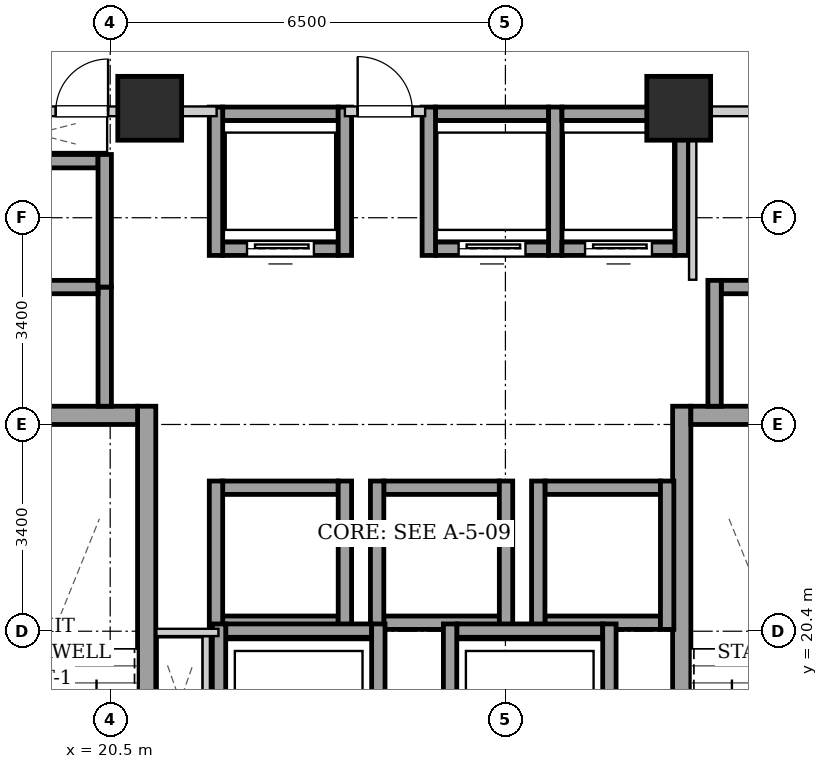
"""IFC4 building model, lengths in metres.
Left out: names, types, materials, properties, quantities, classifications, styles, units other than length and angle.
Written with IfcOpenShell. Run it as: python <this file> out.ifc"""

import sys

from ifc_helpers import new_model, si_unit, direction, frame, frame_2d, origin, origin_2d, place, context, subcontext, project, spatial, rectangle, extrude, element, fill, save


model = new_model("IFC4")
c1 = context("Model", 3, precision=1e-05, world=origin(), true_north=direction((0.0, 1.0)))
c2 = subcontext(c1, "Body", "Model", "MODEL_VIEW")
j1 = project(units=[si_unit("LENGTHUNIT", "METRE"), si_unit("PLANEANGLEUNIT", "RADIAN")], contexts=[c1])
p1 = place(None, origin())
s1 = spatial("IfcSite", under=j1, at=p1, CompositionType="ELEMENT")
p2 = place(p1, origin())
s2 = spatial("IfcBuilding", under=s1, at=p2, CompositionType="ELEMENT")
p3 = place(p2, frame((0.0, 0.0, 119.9)))
s3 = spatial("IfcBuildingStorey", under=s2, at=p3, CompositionType="ELEMENT", Elevation=119.9)
for number, where, z_axis, x_axis in (
    (1, (21.15, 29.0, 0.0), (0.0, 0.0, 1.0), (1.0, 0.0, 0.0)),
    (2, (29.85, 29.0, 0.0), (0.0, 0.0, 1.0), (1.0, 0.0, 0.0)),
):
    element("IfcColumn", number, at=place(p3, frame(where, z_axis=z_axis, x_axis=x_axis)), inside=s3, PredefinedType="COLUMN", context=c2, shape_type="SweptSolid", body=[
        extrude(rectangle(XDim=1.05, YDim=1.05, at=origin_2d()), origin(), (0.0, 0.0, 1.0), 4.5),
    ])
p4 = place(p3, frame((21.1, 15.1, 0.0), z_axis=(0.0, 0.0, 1.0), x_axis=(0.0, 1.0, 0.0)))
e3 = element("IfcWall", 3, at=p4, inside=s3, PredefinedType="SHEAR", context=c2, shape_type="SweptSolid", body=[
    extrude(rectangle(XDim=9.0, YDim=0.3, at=frame_2d((4.5, 0.0))), origin(), (0.0, 0.0, 1.0), 4.18),
])
p5 = place(p3, frame((18.1, 23.95, 0.0), z_axis=(0.0, 0.0, 1.0), x_axis=(1.0, 0.0, 0.0)))
e4 = element("IfcWall", 4, at=p5, inside=s3, PredefinedType="SHEAR", context=c2, shape_type="SweptSolid", body=[
    extrude(rectangle(XDim=2.85, YDim=0.3, at=frame_2d((1.425, 0.0))), origin(), (0.0, 0.0, 1.0), 4.18),
])
p6 = place(p3, frame((29.9, 15.1, 0.0), z_axis=(0.0, 0.0, 1.0), x_axis=(0.0, 1.0, 0.0)))
e5 = element("IfcWall", 5, at=p6, inside=s3, PredefinedType="SHEAR", context=c2, shape_type="SweptSolid", body=[
    extrude(rectangle(XDim=9.0, YDim=0.3, at=frame_2d((4.5, 0.0))), origin(), (0.0, 0.0, 1.0), 4.18),
])
p7 = place(p3, frame((30.05, 23.95, 0.0), z_axis=(0.0, 0.0, 1.0), x_axis=(1.0, 0.0, 0.0)))
e6 = element("IfcWall", 6, at=p7, inside=s3, PredefinedType="SHEAR", context=c2, shape_type="SweptSolid", body=[
    extrude(rectangle(XDim=2.85, YDim=0.3, at=frame_2d((1.425, 0.0))), origin(), (0.0, 0.0, 1.0), 4.18),
])
p8 = place(p3, frame((22.35, 26.69, 0.0), z_axis=(0.0, 0.0, 1.0), x_axis=(1.0, 0.0, 0.0)))
e7 = element("IfcWall", 7, at=p8, inside=s3, PredefinedType="SHEAR", context=c2, shape_type="SweptSolid", body=[
    extrude(rectangle(XDim=1.9, YDim=0.22, at=frame_2d((0.95, 0.0))), origin(), (0.0, 0.0, 1.0), 4.18),
])
p9 = place(p8, frame((0.4, 0.0, 0.0)))
e8 = element("IfcOpeningElement", 8, at=p9, cuts=e7, PredefinedType="OPENING", context=c2, shape_type="SweptSolid", body=[
    extrude(rectangle(XDim=1.1, YDim=2.15, at=frame_2d((0.55, 1.075))), frame((0.0, 0.12, 0.0), z_axis=(0.0, -1.0, 0.0), x_axis=(1.0, 0.0, 0.0)), (0.0, 0.0, 1.0), 0.24),
])
p10 = place(p3, frame((22.35, 28.91, 0.0), z_axis=(0.0, 0.0, 1.0), x_axis=(1.0, 0.0, 0.0)))
e9 = element("IfcWall", 9, at=p10, inside=s3, PredefinedType="SHEAR", context=c2, shape_type="SweptSolid", body=[
    extrude(rectangle(XDim=1.9, YDim=0.22, at=frame_2d((0.95, 0.0))), origin(), (0.0, 0.0, 1.0), 4.18),
])
for number, where, z_axis, x_axis in (
    (10, (22.24, 26.58, 0.0), (0.0, 0.0, 1.0), (0.0, 1.0, 0.0)),
    (11, (24.36, 26.58, 0.0), (0.0, 0.0, 1.0), (0.0, 1.0, 0.0)),
):
    element("IfcWall", number, at=place(p3, frame(where, z_axis=z_axis, x_axis=x_axis)), inside=s3, PredefinedType="SHEAR", context=c2, shape_type="SweptSolid", body=[
        extrude(rectangle(XDim=2.44, YDim=0.22, at=frame_2d((1.22, 0.0))), origin(), (0.0, 0.0, 1.0), 4.18),
    ])
p11 = place(p3, frame((25.85, 26.69, 0.0), z_axis=(0.0, 0.0, 1.0), x_axis=(1.0, 0.0, 0.0)))
e12 = element("IfcWall", 12, at=p11, inside=s3, PredefinedType="SHEAR", context=c2, shape_type="SweptSolid", body=[
    extrude(rectangle(XDim=1.86, YDim=0.22, at=frame_2d((0.93, 0.0))), origin(), (0.0, 0.0, 1.0), 4.18),
])
p12 = place(p11, frame((0.38, 0.0, 0.0)))
e13 = element("IfcOpeningElement", 13, at=p12, cuts=e12, PredefinedType="OPENING", context=c2, shape_type="SweptSolid", body=[
    extrude(rectangle(XDim=1.1, YDim=2.15, at=frame_2d((0.55, 1.075))), frame((0.0, 0.12, 0.0), z_axis=(0.0, -1.0, 0.0), x_axis=(1.0, 0.0, 0.0)), (0.0, 0.0, 1.0), 0.24),
])
p13 = place(p3, frame((25.85, 28.91, 0.0), z_axis=(0.0, 0.0, 1.0), x_axis=(1.0, 0.0, 0.0)))
e14 = element("IfcWall", 14, at=p13, inside=s3, PredefinedType="SHEAR", context=c2, shape_type="SweptSolid", body=[
    extrude(rectangle(XDim=1.86, YDim=0.22, at=frame_2d((0.93, 0.0))), origin(), (0.0, 0.0, 1.0), 4.18),
])
for number, where, z_axis, x_axis in (
    (15, (25.74, 26.58, 0.0), (0.0, 0.0, 1.0), (0.0, 1.0, 0.0)),
    (16, (27.82, 26.58, 0.0), (0.0, 0.0, 1.0), (0.0, 1.0, 0.0)),
):
    element("IfcWall", number, at=place(p3, frame(where, z_axis=z_axis, x_axis=x_axis)), inside=s3, PredefinedType="SHEAR", context=c2, shape_type="SweptSolid", body=[
        extrude(rectangle(XDim=2.44, YDim=0.22, at=frame_2d((1.22, 0.0))), origin(), (0.0, 0.0, 1.0), 4.18),
    ])
p14 = place(p3, frame((27.93, 26.69, 0.0), z_axis=(0.0, 0.0, 1.0), x_axis=(1.0, 0.0, 0.0)))
e17 = element("IfcWall", 17, at=p14, inside=s3, PredefinedType="SHEAR", context=c2, shape_type="SweptSolid", body=[
    extrude(rectangle(XDim=1.86, YDim=0.22, at=frame_2d((0.93, 0.0))), origin(), (0.0, 0.0, 1.0), 4.18),
])
p15 = place(p14, frame((0.38, 0.0, 0.0)))
e18 = element("IfcOpeningElement", 18, at=p15, cuts=e17, PredefinedType="OPENING", context=c2, shape_type="SweptSolid", body=[
    extrude(rectangle(XDim=1.1, YDim=2.15, at=frame_2d((0.55, 1.075))), frame((0.0, 0.12, 0.0), z_axis=(0.0, -1.0, 0.0), x_axis=(1.0, 0.0, 0.0)), (0.0, 0.0, 1.0), 0.24),
])
p16 = place(p3, frame((27.93, 28.91, 0.0), z_axis=(0.0, 0.0, 1.0), x_axis=(1.0, 0.0, 0.0)))
e19 = element("IfcWall", 19, at=p16, inside=s3, PredefinedType="SHEAR", context=c2, shape_type="SweptSolid", body=[
    extrude(rectangle(XDim=1.86, YDim=0.22, at=frame_2d((0.93, 0.0))), origin(), (0.0, 0.0, 1.0), 4.18),
])
p17 = place(p3, frame((29.9, 26.58, 0.0), z_axis=(0.0, 0.0, 1.0), x_axis=(0.0, 1.0, 0.0)))
e20 = element("IfcWall", 20, at=p17, inside=s3, PredefinedType="SHEAR", context=c2, shape_type="SweptSolid", body=[
    extrude(rectangle(XDim=2.44, YDim=0.22, at=frame_2d((1.22, 0.0))), origin(), (0.0, 0.0, 1.0), 4.18),
])
for number, where, z_axis, x_axis in (
    (21, (22.35, 20.54, 0.0), (0.0, 0.0, 1.0), (1.0, 0.0, 0.0)),
    (22, (22.35, 22.76, 0.0), (0.0, 0.0, 1.0), (1.0, 0.0, 0.0)),
):
    element("IfcWall", number, at=place(p3, frame(where, z_axis=z_axis, x_axis=x_axis)), inside=s3, PredefinedType="SHEAR", context=c2, shape_type="SweptSolid", body=[
        extrude(rectangle(XDim=1.9, YDim=0.22, at=frame_2d((0.95, 0.0))), origin(), (0.0, 0.0, 1.0), 4.18),
    ])
for number, where, z_axis, x_axis in (
    (23, (22.24, 20.43, 0.0), (0.0, 0.0, 1.0), (0.0, 1.0, 0.0)),
    (24, (24.36, 20.43, 0.0), (0.0, 0.0, 1.0), (0.0, 1.0, 0.0)),
):
    element("IfcWall", number, at=place(p3, frame(where, z_axis=z_axis, x_axis=x_axis)), inside=s3, PredefinedType="SHEAR", context=c2, shape_type="SweptSolid", body=[
        extrude(rectangle(XDim=2.44, YDim=0.22, at=frame_2d((1.22, 0.0))), origin(), (0.0, 0.0, 1.0), 4.18),
    ])
for number, where, z_axis, x_axis in (
    (25, (25.0, 20.54, 0.0), (0.0, 0.0, 1.0), (1.0, 0.0, 0.0)),
    (26, (25.0, 22.76, 0.0), (0.0, 0.0, 1.0), (1.0, 0.0, 0.0)),
):
    element("IfcWall", number, at=place(p3, frame(where, z_axis=z_axis, x_axis=x_axis)), inside=s3, PredefinedType="SHEAR", context=c2, shape_type="SweptSolid", body=[
        extrude(rectangle(XDim=1.9, YDim=0.22, at=frame_2d((0.95, 0.0))), origin(), (0.0, 0.0, 1.0), 4.18),
    ])
for number, where, z_axis, x_axis in (
    (27, (24.89, 20.43, 0.0), (0.0, 0.0, 1.0), (0.0, 1.0, 0.0)),
    (28, (27.01, 20.43, 0.0), (0.0, 0.0, 1.0), (0.0, 1.0, 0.0)),
):
    element("IfcWall", number, at=place(p3, frame(where, z_axis=z_axis, x_axis=x_axis)), inside=s3, PredefinedType="SHEAR", context=c2, shape_type="SweptSolid", body=[
        extrude(rectangle(XDim=2.44, YDim=0.22, at=frame_2d((1.22, 0.0))), origin(), (0.0, 0.0, 1.0), 4.18),
    ])
for number, where, z_axis, x_axis in (
    (29, (27.65, 20.54, 0.0), (0.0, 0.0, 1.0), (1.0, 0.0, 0.0)),
    (30, (27.65, 22.76, 0.0), (0.0, 0.0, 1.0), (1.0, 0.0, 0.0)),
):
    element("IfcWall", number, at=place(p3, frame(where, z_axis=z_axis, x_axis=x_axis)), inside=s3, PredefinedType="SHEAR", context=c2, shape_type="SweptSolid", body=[
        extrude(rectangle(XDim=1.9, YDim=0.22, at=frame_2d((0.95, 0.0))), origin(), (0.0, 0.0, 1.0), 4.18),
    ])
for number, where, z_axis, x_axis in (
    (31, (27.54, 20.43, 0.0), (0.0, 0.0, 1.0), (0.0, 1.0, 0.0)),
    (32, (29.66, 20.43, 0.0), (0.0, 0.0, 1.0), (0.0, 1.0, 0.0)),
):
    element("IfcWall", number, at=place(p3, frame(where, z_axis=z_axis, x_axis=x_axis)), inside=s3, PredefinedType="SHEAR", context=c2, shape_type="SweptSolid", body=[
        extrude(rectangle(XDim=2.44, YDim=0.22, at=frame_2d((1.22, 0.0))), origin(), (0.0, 0.0, 1.0), 4.18),
    ])
p18 = place(p3, frame((20.41, 24.1, 0.0), z_axis=(0.0, 0.0, 1.0), x_axis=(0.0, 1.0, 0.0)))
e33 = element("IfcWall", 33, at=p18, inside=s3, PredefinedType="SHEAR", context=c2, shape_type="SweptSolid", body=[
    extrude(rectangle(XDim=1.96, YDim=0.22, at=frame_2d((0.98, 0.0))), origin(), (0.0, 0.0, 1.0), 4.18),
])
for number, where, z_axis, x_axis in (
    (34, (18.4, 26.06, 0.0), (0.0, 0.0, 1.0), (1.0, 0.0, 0.0)),
    (35, (18.4, 28.13, 0.0), (0.0, 0.0, 1.0), (1.0, 0.0, 0.0)),
):
    element("IfcWall", number, at=place(p3, frame(where, z_axis=z_axis, x_axis=x_axis)), inside=s3, PredefinedType="SHEAR", context=c2, shape_type="SweptSolid", body=[
        extrude(rectangle(XDim=1.9, YDim=0.22, at=frame_2d((0.95, 0.0))), origin(), (0.0, 0.0, 1.0), 4.18),
    ])
p19 = place(p3, frame((20.41, 26.06, 0.0), z_axis=(0.0, 0.0, 1.0), x_axis=(0.0, 1.0, 0.0)))
e36 = element("IfcWall", 36, at=p19, inside=s3, PredefinedType="SHEAR", context=c2, shape_type="SweptSolid", body=[
    extrude(rectangle(XDim=2.18, YDim=0.22, at=frame_2d((1.09, 0.0))), origin(), (0.0, 0.0, 1.0), 4.18),
])
p20 = place(p3, frame((30.55, 26.06, 0.0), z_axis=(0.0, 0.0, 1.0), x_axis=(1.0, 0.0, 0.0)))
e37 = element("IfcWall", 37, at=p20, inside=s3, PredefinedType="SHEAR", context=c2, shape_type="SweptSolid", body=[
    extrude(rectangle(XDim=1.9, YDim=0.22, at=frame_2d((0.95, 0.0))), origin(), (0.0, 0.0, 1.0), 4.18),
])
p21 = place(p3, frame((30.44, 24.1, 0.0), z_axis=(0.0, 0.0, 1.0), x_axis=(0.0, 1.0, 0.0)))
e38 = element("IfcWall", 38, at=p21, inside=s3, PredefinedType="SHEAR", context=c2, shape_type="SweptSolid", body=[
    extrude(rectangle(XDim=2.07, YDim=0.22, at=frame_2d((1.035, 0.0))), origin(), (0.0, 0.0, 1.0), 4.18),
])
p22 = place(p3, frame((22.4, 20.41, 0.0), z_axis=(0.0, 0.0, 1.0), x_axis=(1.0, 0.0, 0.0)))
e39 = element("IfcWall", 39, at=p22, inside=s3, PredefinedType="SHEAR", context=c2, shape_type="SweptSolid", body=[
    extrude(rectangle(XDim=2.4, YDim=0.22, at=frame_2d((1.2, 0.0))), origin(), (0.0, 0.0, 1.0), 4.18),
])
for number, where, z_axis, x_axis in (
    (40, (22.29, 17.98, 0.0), (0.0, 0.0, 1.0), (0.0, 1.0, 0.0)),
    (41, (24.91, 17.98, 0.0), (0.0, 0.0, 1.0), (0.0, 1.0, 0.0)),
):
    element("IfcWall", number, at=place(p3, frame(where, z_axis=z_axis, x_axis=x_axis)), inside=s3, PredefinedType="SHEAR", context=c2, shape_type="SweptSolid", body=[
        extrude(rectangle(XDim=2.54, YDim=0.22, at=frame_2d((1.27, 0.0))), origin(), (0.0, 0.0, 1.0), 4.18),
    ])
p23 = place(p3, frame((26.2, 20.41, 0.0), z_axis=(0.0, 0.0, 1.0), x_axis=(1.0, 0.0, 0.0)))
e42 = element("IfcWall", 42, at=p23, inside=s3, PredefinedType="SHEAR", context=c2, shape_type="SweptSolid", body=[
    extrude(rectangle(XDim=2.4, YDim=0.22, at=frame_2d((1.2, 0.0))), origin(), (0.0, 0.0, 1.0), 4.18),
])
for number, where, z_axis, x_axis in (
    (43, (26.09, 17.98, 0.0), (0.0, 0.0, 1.0), (0.0, 1.0, 0.0)),
    (44, (28.71, 17.98, 0.0), (0.0, 0.0, 1.0), (0.0, 1.0, 0.0)),
):
    element("IfcWall", number, at=place(p3, frame(where, z_axis=z_axis, x_axis=x_axis)), inside=s3, PredefinedType="SHEAR", context=c2, shape_type="SweptSolid", body=[
        extrude(rectangle(XDim=2.54, YDim=0.22, at=frame_2d((1.27, 0.0))), origin(), (0.0, 0.0, 1.0), 4.18),
    ])
p24 = place(p3, frame((24.36, 28.95, 0.0), z_axis=(0.0, 0.0, 1.0), x_axis=(1.0, 0.0, 0.0)))
e45 = element("IfcWall", 45, at=p24, inside=s3, PredefinedType="PARTITIONING", context=c2, shape_type="SweptSolid", body=[
    extrude(rectangle(XDim=1.32, YDim=0.16, at=frame_2d((0.66, 0.0))), origin(), (0.0, 0.0, 1.0), 4.18),
])
p25 = place(p24, frame((0.21, 0.0, 0.0)))
e46 = element("IfcOpeningElement", 46, at=p25, cuts=e45, PredefinedType="OPENING", context=c2, shape_type="SweptSolid", body=[
    extrude(rectangle(XDim=0.9, YDim=2.05, at=frame_2d((0.45, 1.025))), frame((0.0, 0.09, 0.0), z_axis=(0.0, -1.0, 0.0), x_axis=(1.0, 0.0, 0.0)), (0.0, 0.0, 1.0), 0.18),
])
p26 = place(p3, frame((17.96, 28.95, 0.0), z_axis=(0.0, 0.0, 1.0), x_axis=(1.0, 0.0, 0.0)))
e47 = element("IfcWall", 47, at=p26, inside=s3, PredefinedType="PARTITIONING", context=c2, shape_type="SweptSolid", body=[
    extrude(rectangle(XDim=4.29, YDim=0.16, at=frame_2d((2.145, 0.0))), origin(), (0.0, 0.0, 1.0), 4.18),
])
p27 = place(p26, frame((1.645, 0.0, 0.0)))
e48 = element("IfcOpeningElement", 48, at=p27, cuts=e47, PredefinedType="OPENING", context=c2, shape_type="SweptSolid", body=[
    extrude(rectangle(XDim=0.86, YDim=2.05, at=frame_2d((0.43, 1.025))), frame((0.0, 0.09, 0.0), z_axis=(0.0, -1.0, 0.0), x_axis=(1.0, 0.0, 0.0)), (0.0, 0.0, 1.0), 0.18),
])
p28 = place(p3, frame((22.08, 18.2, 0.0), z_axis=(0.0, 0.0, 1.0), x_axis=(0.0, 1.0, 0.0)))
e49 = element("IfcWall", 49, at=p28, inside=s3, PredefinedType="PARTITIONING", context=c2, shape_type="SweptSolid", body=[
    extrude(rectangle(XDim=2.12, YDim=0.12, at=frame_2d((1.06, 0.0))), origin(), (0.0, 0.0, 1.0), 4.18),
])
p29 = place(p3, frame((22.28, 20.38, 0.0), z_axis=(0.0, 0.0, 1.0), x_axis=(-1.0, 0.0, 0.0)))
e50 = element("IfcWall", 50, at=p29, inside=s3, PredefinedType="PARTITIONING", context=c2, shape_type="SweptSolid", body=[
    extrude(rectangle(XDim=1.02, YDim=0.12, at=frame_2d((0.51, 0.0))), origin(), (0.0, 0.0, 1.0), 4.18),
])
p30 = place(p3, frame((30.08, 26.18, 0.0), z_axis=(0.0, 0.0, 1.0), x_axis=(0.0, 1.0, 0.0)))
e51 = element("IfcWall", 51, at=p30, inside=s3, PredefinedType="PARTITIONING", context=c2, shape_type="SweptSolid", body=[
    extrude(rectangle(XDim=2.68, YDim=0.12, at=frame_2d((1.34, 0.0))), origin(), (0.0, 0.0, 1.0), 4.18),
])
p31 = place(p3, frame((30.08, 28.95, 0.0), z_axis=(0.0, 0.0, 1.0), x_axis=(1.0, 0.0, 0.0)))
e52 = element("IfcWall", 52, at=p31, inside=s3, PredefinedType="PARTITIONING", context=c2, shape_type="SweptSolid", body=[
    extrude(rectangle(XDim=2.96, YDim=0.16, at=frame_2d((1.48, 0.0))), origin(), (0.0, 0.0, 1.0), 4.18),
])
p32 = place(p31, frame((1.045, 0.0, 0.0)))
e53 = element("IfcOpeningElement", 53, at=p32, cuts=e52, PredefinedType="OPENING", context=c2, shape_type="SweptSolid", body=[
    extrude(rectangle(XDim=0.86, YDim=2.05, at=frame_2d((0.43, 1.025))), frame((0.0, 0.09, 0.0), z_axis=(0.0, -1.0, 0.0), x_axis=(1.0, 0.0, 0.0)), (0.0, 0.0, 1.0), 0.18),
])
p33 = place(p9, origin())
e54 = element("IfcDoor", 54, at=p33, inside=s3, OperationType="SLIDING_TO_LEFT", PredefinedType="DOOR", context=c2, shape_type="SweptSolid", body=[
    extrude(rectangle(XDim=1.1, YDim=2.15, at=frame_2d((0.55, 1.075))), frame((0.0, 0.025, 0.0), z_axis=(0.0, -1.0, 0.0), x_axis=(1.0, 0.0, 0.0)), (0.0, 0.0, 1.0), 0.05),
])
fill(e8, e54)
p34 = place(p12, origin())
e55 = element("IfcDoor", 55, at=p34, inside=s3, OperationType="SLIDING_TO_LEFT", PredefinedType="DOOR", context=c2, shape_type="SweptSolid", body=[
    extrude(rectangle(XDim=1.1, YDim=2.15, at=frame_2d((0.55, 1.075))), frame((0.0, 0.025, 0.0), z_axis=(0.0, -1.0, 0.0), x_axis=(1.0, 0.0, 0.0)), (0.0, 0.0, 1.0), 0.05),
])
fill(e13, e55)
p35 = place(p15, origin())
e56 = element("IfcDoor", 56, at=p35, inside=s3, OperationType="SLIDING_TO_LEFT", PredefinedType="DOOR", context=c2, shape_type="SweptSolid", body=[
    extrude(rectangle(XDim=1.1, YDim=2.15, at=frame_2d((0.55, 1.075))), frame((0.0, 0.025, 0.0), z_axis=(0.0, -1.0, 0.0), x_axis=(1.0, 0.0, 0.0)), (0.0, 0.0, 1.0), 0.05),
])
fill(e18, e56)
p36 = place(p25, origin())
e57 = element("IfcDoor", 57, at=p36, inside=s3, OperationType="SINGLE_SWING_LEFT", PredefinedType="DOOR", context=c2, shape_type="SweptSolid", body=[
    extrude(rectangle(XDim=0.9, YDim=2.05, at=frame_2d((0.45, 1.025))), frame((0.0, 0.025, 0.0), z_axis=(0.0, -1.0, 0.0), x_axis=(1.0, 0.0, 0.0)), (0.0, 0.0, 1.0), 0.05),
])
fill(e46, e57)
p37 = place(p27, origin())
e58 = element("IfcDoor", 58, at=p37, inside=s3, OperationType="SINGLE_SWING_RIGHT", PredefinedType="DOOR", context=c2, shape_type="SweptSolid", body=[
    extrude(rectangle(XDim=0.86, YDim=2.05, at=frame_2d((0.43, 1.025))), frame((0.0, 0.025, 0.0), z_axis=(0.0, -1.0, 0.0), x_axis=(1.0, 0.0, 0.0)), (0.0, 0.0, 1.0), 0.05),
])
fill(e48, e58)
save(model, sys.argv[1])
